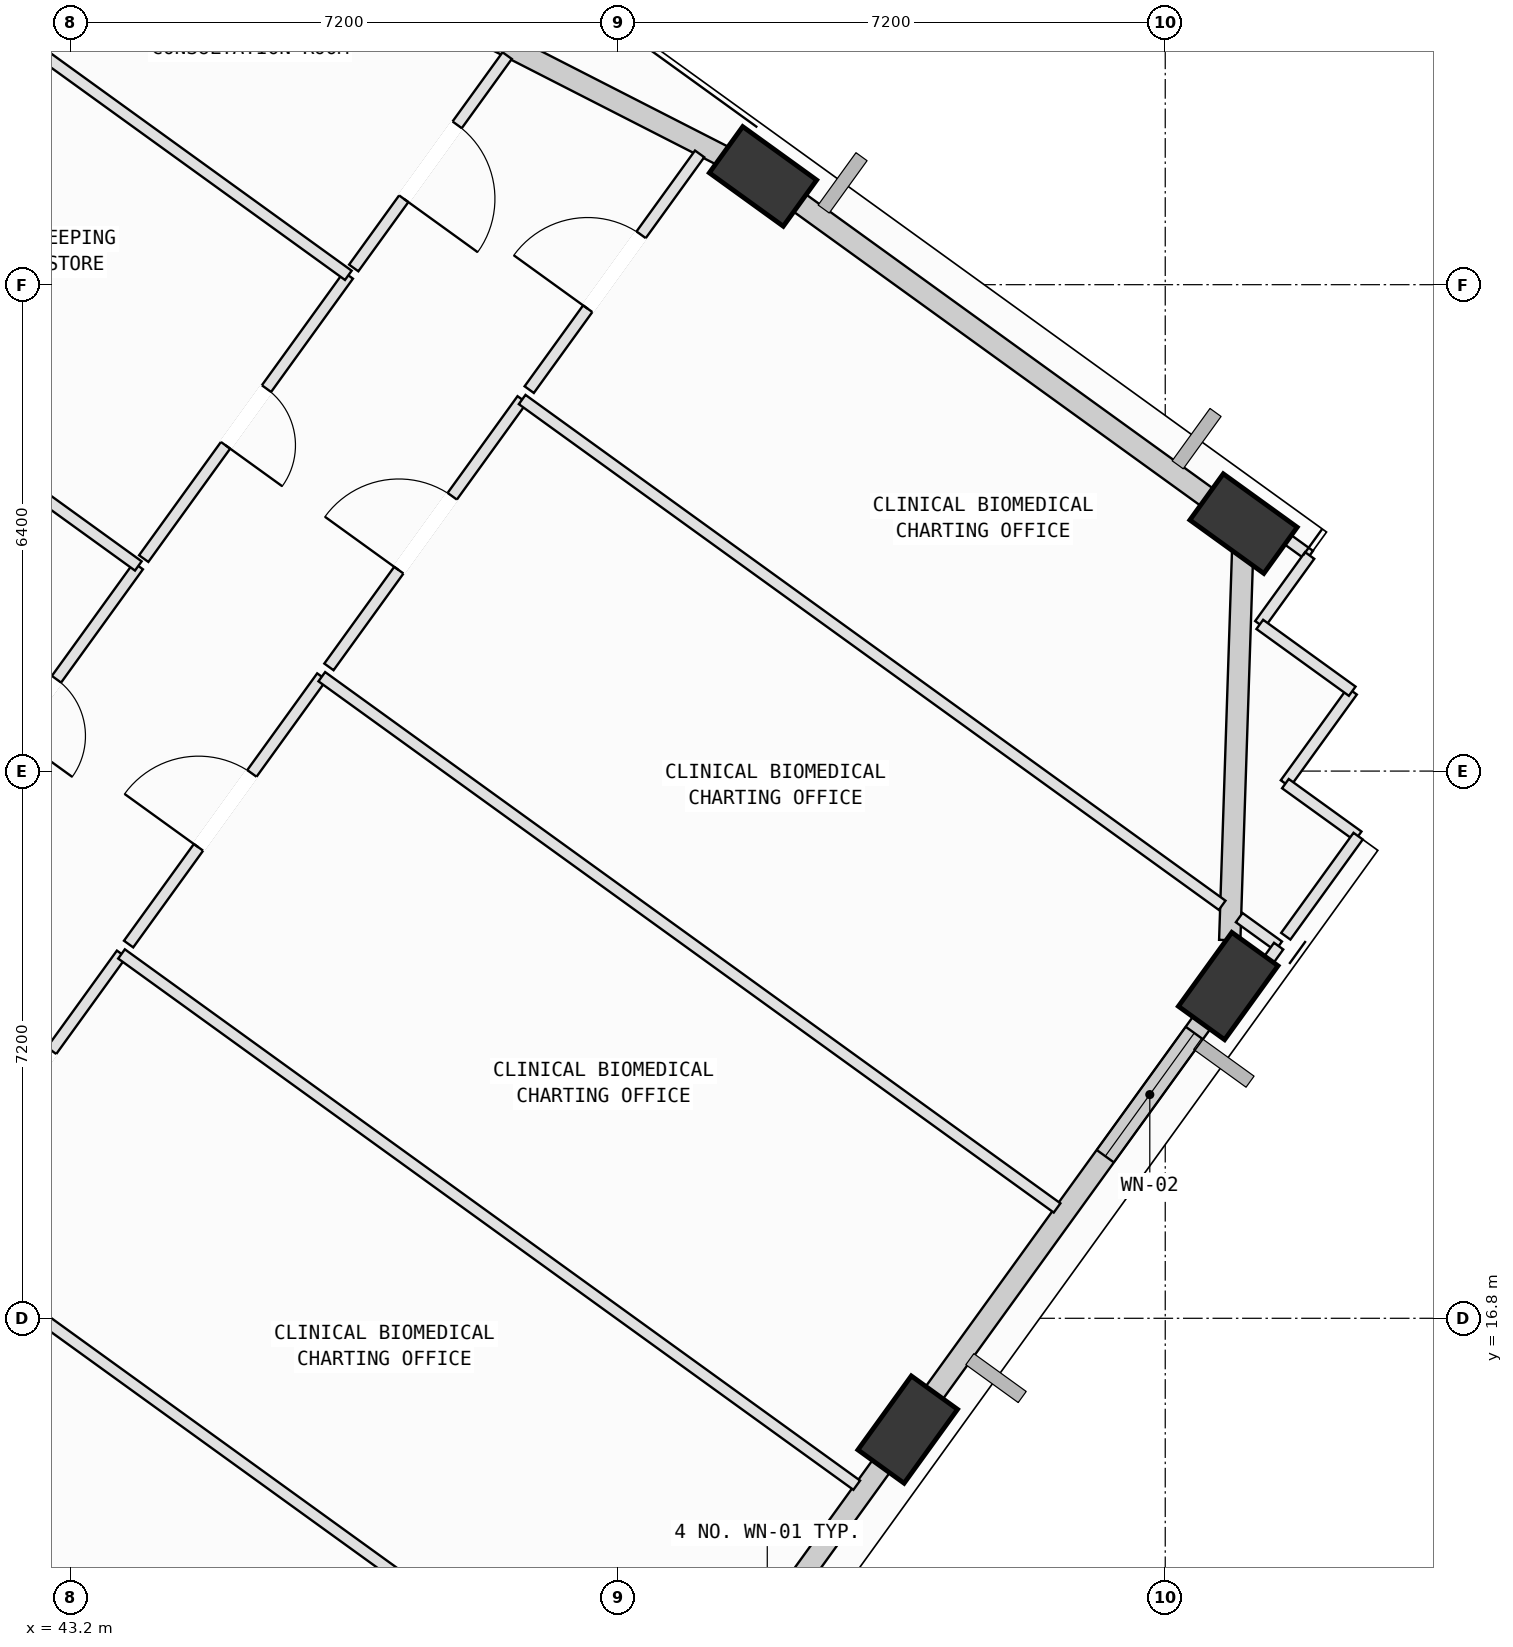
"""IFC4 building model, lengths in metres.
Left out: names, types, materials, properties, quantities, classifications, styles, units other than length and angle.
Written with IfcOpenShell. Run it as: python <this file> out.ifc"""

import sys

from ifc_helpers import new_model, si_unit, direction, frame, frame_2d, origin, origin_2d, place, context, subcontext, project, spatial, rectangle, extrude, element, fill, save


model = new_model("IFC4")
c1 = context("Model", 3, precision=1e-05, world=origin(), true_north=direction((0.0, 1.0)))
c2 = subcontext(c1, "Body", "Model", "MODEL_VIEW")
j1 = project(units=[si_unit("LENGTHUNIT", "METRE"), si_unit("PLANEANGLEUNIT", "RADIAN")], contexts=[c1])
p1 = place(None, origin())
s1 = spatial("IfcSite", under=j1, at=p1, CompositionType="ELEMENT")
p2 = place(p1, origin())
s2 = spatial("IfcBuilding", under=s1, at=p2, CompositionType="ELEMENT")
p3 = place(p2, frame((0.0, 0.0, 255.2)))
s3 = spatial("IfcBuildingStorey", under=s2, at=p3, CompositionType="ELEMENT", Elevation=255.2)
p4 = place(p3, frame((54.212, 15.335, 0.002), z_axis=(0.038318426238, 0.085395349901, 0.995610030296), x_axis=(-0.864713750132, -0.496502169968, 0.075866498211)))
e1 = element("IfcColumn", 1, at=p4, inside=s3, PredefinedType="COLUMN", context=c2, shape_type="SweptSolid", body=[
    extrude(rectangle(XDim=1.2, YDim=0.75, at=origin_2d()), origin(), (0.0, 0.0, 1.0), 4.014),
])
p5 = place(p3, frame((58.428, 21.172, 0.002), z_axis=(0.014157894762, 0.102447255662, 0.994637679672), x_axis=(-0.69051780132, -0.718441374913, 0.08382813891)))
e2 = element("IfcColumn", 2, at=p5, inside=s3, PredefinedType="COLUMN", context=c2, shape_type="SweptSolid", body=[
    extrude(rectangle(XDim=1.2, YDim=0.75, at=origin_2d()), origin(), (0.0, 0.0, 1.0), 4.018),
])
p6 = place(p3, frame((58.63, 27.256, 0.002), z_axis=(-0.010937120027, 0.103112737144, 0.994609542908), x_axis=(0.867473204164, -0.493763417536, 0.060728309384)))
e3 = element("IfcColumn", 3, at=p6, inside=s3, PredefinedType="COLUMN", context=c2, shape_type="SweptSolid", body=[
    extrude(rectangle(XDim=1.2, YDim=0.75, at=origin_2d()), origin(), (0.0, 0.0, 1.0), 4.018),
])
p7 = place(p3, frame((52.308, 31.824, 0.002), z_axis=(-0.029649872791, 0.077016610023, 0.996588845424), x_axis=(0.966131124092, -0.253484840715, 0.048333079659)))
e4 = element("IfcColumn", 4, at=p7, inside=s3, PredefinedType="COLUMN", context=c2, shape_type="SweptSolid", body=[
    extrude(rectangle(XDim=1.2, YDim=0.75, at=origin_2d()), origin(), (0.0, 0.0, 1.0), 4.01),
])
p8 = place(p3, frame((54.088, 15.164, 0.0), z_axis=(0.0, 0.0, 1.0), x_axis=(-0.585656107045, -0.810559636474, 0.0)))
e5 = element("IfcWall", 5, at=p8, inside=s3, PredefinedType="SOLIDWALL", context=c2, shape_type="SweptSolid", body=[
    extrude(rectangle(XDim=6.407, YDim=0.28, at=frame_2d((3.203, 0.0))), origin(), (0.0, 0.0, 1.0), 3.265),
])
p9 = place(p8, frame((2.143, 0.0, 0.75)))
e6 = element("IfcOpeningElement", 6, at=p9, cuts=e5, PredefinedType="OPENING", context=c2, shape_type="SweptSolid", body=[
    extrude(rectangle(XDim=1.6, YDim=1.95, at=frame_2d((0.8, 0.975))), frame((0.0, 0.15, 0.0), z_axis=(0.0, -1.0, 0.0), x_axis=(1.0, 0.0, 0.0)), (0.0, 0.0, 1.0), 0.3),
])
p10 = place(p3, frame((58.31, 21.008, 0.0), z_axis=(0.0, 0.0, 1.0), x_axis=(-0.585669695787, -0.810549817986, 0.0)))
e7 = element("IfcWall", 7, at=p10, inside=s3, PredefinedType="SOLIDWALL", context=c2, shape_type="SweptSolid", body=[
    extrude(rectangle(XDim=6.418, YDim=0.28, at=frame_2d((3.209, 0.0))), origin(), (0.0, 0.0, 1.0), 3.265),
])
p11 = place(p10, frame((0.56, 0.0, 0.75)))
e8 = element("IfcOpeningElement", 8, at=p11, cuts=e7, PredefinedType="OPENING", context=c2, shape_type="SweptSolid", body=[
    extrude(rectangle(XDim=2.0, YDim=1.95, at=frame_2d((1.0, 0.975))), frame((0.0, 0.15, 0.0), z_axis=(0.0, -1.0, 0.0), x_axis=(1.0, 0.0, 0.0)), (0.0, 0.0, 1.0), 0.3),
])
p12 = place(p3, frame((58.624, 27.066, 0.0), z_axis=(0.0, 0.0, 1.0), x_axis=(-0.03315820566, -0.999450115512, 0.0)))
e9 = element("IfcWall", 9, at=p12, inside=s3, PredefinedType="SOLIDWALL", context=c2, shape_type="SweptSolid", body=[
    extrude(rectangle(XDim=5.294, YDim=0.28, at=frame_2d((2.647, 0.0))), origin(), (0.0, 0.0, 1.0), 3.265),
])
p13 = place(p3, frame((52.509, 31.679, 0.0), z_axis=(0.0, 0.0, 1.0), x_axis=(0.81055861037, -0.58565752719, 0.0)))
e10 = element("IfcWall", 10, at=p13, inside=s3, PredefinedType="SOLIDWALL", context=c2, shape_type="SweptSolid", body=[
    extrude(rectangle(XDim=7.046, YDim=0.28, at=frame_2d((3.523, 0.0))), origin(), (0.0, 0.0, 1.0), 3.265),
])
p14 = place(p3, frame((43.811, 36.165, 0.0), z_axis=(0.0, 0.0, 1.0), x_axis=(0.890535873605, -0.454913022261, 0.0)))
e11 = element("IfcWall", 11, at=p14, inside=s3, PredefinedType="SOLIDWALL", context=c2, shape_type="SweptSolid", body=[
    extrude(rectangle(XDim=9.037, YDim=0.28, at=frame_2d((4.518, 0.0))), origin(), (0.0, 0.0, 1.0), 3.265),
])
p15 = place(p3, frame((39.381, 30.496, 0.0), z_axis=(0.0, 0.0, 1.0), x_axis=(0.585668033743, 0.810551018908, 0.0)))
e12 = element("IfcWall", 12, at=p15, inside=s3, PredefinedType="SOLIDWALL", context=c2, shape_type="SweptSolid", body=[
    extrude(rectangle(XDim=6.78, YDim=0.28, at=frame_2d((3.39, 0.0))), origin(), (0.0, 0.0, 1.0), 3.265),
])
p16 = place(p15, frame((1.295, 0.0, 0.75)))
e13 = element("IfcOpeningElement", 13, at=p16, cuts=e12, PredefinedType="OPENING", context=c2, shape_type="SweptSolid", body=[
    extrude(rectangle(XDim=1.6, YDim=1.95, at=frame_2d((0.8, 0.975))), frame((0.0, 0.15, 0.0), z_axis=(0.0, -1.0, 0.0), x_axis=(1.0, 0.0, 0.0)), (0.0, 0.0, 1.0), 0.3),
])
for number, where, z_axis, x_axis in (
    (14, (38.655, 14.38, 0.0), (0.0, 0.0, 1.0), (0.811, -0.586, 0.0)),
    (15, (41.232, 17.947, 0.0), (0.0, 0.0, 1.0), (0.811, -0.586, 0.0)),
):
    element("IfcWall", number, at=place(p3, frame(where, z_axis=z_axis, x_axis=x_axis)), inside=s3, PredefinedType="PARTITIONING", context=c2, shape_type="SweptSolid", body=[
        extrude(rectangle(XDim=11.935, YDim=0.15, at=frame_2d((5.968, 0.0))), origin(), (0.0, 0.0, 1.0), 3.78),
    ])
p17 = place(p3, frame((41.326, 18.076, 0.0), z_axis=(0.0, 0.0, 1.0), x_axis=(0.585667160303, 0.810551650016, 0.0)))
e16 = element("IfcWall", 16, at=p17, inside=s3, PredefinedType="PARTITIONING", context=c2, shape_type="SweptSolid", body=[
    extrude(rectangle(XDim=4.34, YDim=0.15, at=frame_2d((2.17, 0.0))), origin(), (0.0, 0.0, 1.0), 3.78),
])
p18 = place(p17, frame((1.57, 0.0, 0.0)))
e17 = element("IfcOpeningElement", 17, at=p18, cuts=e16, PredefinedType="OPENING", context=c2, shape_type="SweptSolid", body=[
    extrude(rectangle(XDim=1.2, YDim=2.15, at=frame_2d((0.6, 1.075))), frame((0.0, 0.085, 0.0), z_axis=(0.0, -1.0, 0.0), x_axis=(1.0, 0.0, 0.0)), (0.0, 0.0, 1.0), 0.17),
])
p19 = place(p3, frame((43.868, 21.594, 0.0), z_axis=(0.0, 0.0, 1.0), x_axis=(0.810525461994, -0.585703402295, 0.0)))
e18 = element("IfcWall", 18, at=p19, inside=s3, PredefinedType="PARTITIONING", context=c2, shape_type="SweptSolid", body=[
    extrude(rectangle(XDim=11.934, YDim=0.15, at=frame_2d((5.967, 0.0))), origin(), (0.0, 0.0, 1.0), 3.78),
])
p20 = place(p3, frame((43.961, 21.724, 0.0), z_axis=(0.0, 0.0, 1.0), x_axis=(0.585693863478, 0.810532354865, 0.0)))
e19 = element("IfcWall", 19, at=p20, inside=s3, PredefinedType="PARTITIONING", context=c2, shape_type="SweptSolid", body=[
    extrude(rectangle(XDim=4.34, YDim=0.15, at=frame_2d((2.17, 0.0))), origin(), (0.0, 0.0, 1.0), 3.78),
])
p21 = place(p20, frame((1.57, 0.0, 0.0)))
e20 = element("IfcOpeningElement", 20, at=p21, cuts=e19, PredefinedType="OPENING", context=c2, shape_type="SweptSolid", body=[
    extrude(rectangle(XDim=1.2, YDim=2.15, at=frame_2d((0.6, 1.075))), frame((0.0, 0.085, 0.0), z_axis=(0.0, -1.0, 0.0), x_axis=(1.0, 0.0, 0.0)), (0.0, 0.0, 1.0), 0.17),
])
p22 = place(p3, frame((46.503, 25.242, 0.0), z_axis=(0.0, 0.0, 1.0), x_axis=(0.810553530126, -0.585664558259, 0.0)))
e21 = element("IfcWall", 21, at=p22, inside=s3, PredefinedType="PARTITIONING", context=c2, shape_type="SweptSolid", body=[
    extrude(rectangle(XDim=11.935, YDim=0.15, at=frame_2d((5.968, 0.0))), origin(), (0.0, 0.0, 1.0), 3.78),
])
p23 = place(p3, frame((54.738, 15.671, 0.0), z_axis=(0.0, 0.0, 1.0), x_axis=(-0.585951871419, -0.810345854793, 0.0)))
e22 = element("IfcWall", 22, at=p23, inside=s3, PredefinedType="PARTITIONING", context=c2, shape_type="SweptSolid", body=[
    extrude(rectangle(XDim=0.792, YDim=0.15, at=frame_2d((0.396, 0.0))), origin(), (0.0, 0.0, 1.0), 3.265),
])
p24 = place(p3, frame((46.597, 25.371, 0.0), z_axis=(0.0, 0.0, 1.0), x_axis=(0.585693863478, 0.810532354865, 0.0)))
e23 = element("IfcWall", 23, at=p24, inside=s3, PredefinedType="PARTITIONING", context=c2, shape_type="SweptSolid", body=[
    extrude(rectangle(XDim=4.34, YDim=0.15, at=frame_2d((2.17, 0.0))), origin(), (0.0, 0.0, 1.0), 3.78),
])
p25 = place(p24, frame((1.57, 0.0, 0.0)))
e24 = element("IfcOpeningElement", 24, at=p25, cuts=e23, PredefinedType="OPENING", context=c2, shape_type="SweptSolid", body=[
    extrude(rectangle(XDim=1.2, YDim=2.15, at=frame_2d((0.6, 1.075))), frame((0.0, 0.085, 0.0), z_axis=(0.0, -1.0, 0.0), x_axis=(1.0, 0.0, 0.0)), (0.0, 0.0, 1.0), 0.17),
])
p26 = place(p3, frame((49.139, 28.889, 0.0), z_axis=(0.0, 0.0, 1.0), x_axis=(0.810544932865, -0.585676456593, 0.0)))
e25 = element("IfcWall", 25, at=p26, inside=s3, PredefinedType="PARTITIONING", context=c2, shape_type="SweptSolid", body=[
    extrude(rectangle(XDim=11.363, YDim=0.15, at=frame_2d((5.682, 0.0))), origin(), (0.0, 0.0, 1.0), 3.78),
])
p27 = place(p3, frame((58.573, 22.072, 0.0), z_axis=(0.0, 0.0, 1.0), x_axis=(0.810578678886, -0.585629751067, 0.0)))
e26 = element("IfcWall", 26, at=p27, inside=s3, PredefinedType="PARTITIONING", context=c2, shape_type="SweptSolid", body=[
    extrude(rectangle(XDim=0.64, YDim=0.15, at=frame_2d((0.32, 0.0))), origin(), (0.0, 0.0, 1.0), 3.78),
])
p28 = place(p3, frame((59.092, 21.697, 0.0), z_axis=(0.0, 0.0, 1.0), x_axis=(-0.58541161529, -0.810736233731, 0.0)))
e27 = element("IfcWall", 27, at=p28, inside=s3, PredefinedType="PARTITIONING", context=c2, shape_type="SweptSolid", body=[
    extrude(rectangle(XDim=1.016, YDim=0.15, at=frame_2d((0.508, 0.0))), origin(), (0.0, 0.0, 1.0), 3.265),
])
p29 = place(p3, frame((60.06, 25.051, 0.0), z_axis=(0.0, 0.0, 1.0), x_axis=(-0.585876607151, -0.810400272207, 0.0)))
e28 = element("IfcWall", 28, at=p29, inside=s3, PredefinedType="PARTITIONING", context=c2, shape_type="SweptSolid", body=[
    extrude(rectangle(XDim=1.5, YDim=0.15, at=frame_2d((0.75, 0.0))), origin(), (0.0, 0.0, 1.0), 3.78),
])
p30 = place(p3, frame((59.181, 23.835, 0.0), z_axis=(0.0, 0.0, 1.0), x_axis=(0.810788295009, -0.585339508897, 0.0)))
e29 = element("IfcWall", 29, at=p30, inside=s3, PredefinedType="PARTITIONING", context=c2, shape_type="SweptSolid", body=[
    extrude(rectangle(XDim=1.18, YDim=0.15, at=frame_2d((0.59, 0.0))), origin(), (0.0, 0.0, 1.0), 3.78),
])
p31 = place(p3, frame((60.138, 23.144, 0.0), z_axis=(0.0, 0.0, 1.0), x_axis=(-0.58574832326, -0.810492999228, 0.0)))
e30 = element("IfcWall", 30, at=p31, inside=s3, PredefinedType="PARTITIONING", context=c2, shape_type="SweptSolid", body=[
    extrude(rectangle(XDim=1.625, YDim=0.15, at=frame_2d((0.812, 0.0))), origin(), (0.0, 0.0, 1.0), 3.78),
])
p32 = place(p3, frame((49.232, 29.019, 0.0), z_axis=(0.0, 0.0, 1.0), x_axis=(0.58580257886, 0.810453785605, 0.0)))
e31 = element("IfcWall", 31, at=p32, inside=s3, PredefinedType="PARTITIONING", context=c2, shape_type="SweptSolid", body=[
    extrude(rectangle(XDim=3.828, YDim=0.15, at=frame_2d((1.914, 0.0))), origin(), (0.0, 0.0, 1.0), 3.78),
])
p33 = place(p32, frame((1.314, 0.0, 0.0)))
e32 = element("IfcOpeningElement", 32, at=p33, cuts=e31, PredefinedType="OPENING", context=c2, shape_type="SweptSolid", body=[
    extrude(rectangle(XDim=1.2, YDim=2.15, at=frame_2d((0.6, 1.075))), frame((0.0, 0.085, 0.0), z_axis=(0.0, -1.0, 0.0), x_axis=(1.0, 0.0, 0.0)), (0.0, 0.0, 1.0), 0.17),
])
p34 = place(p3, frame((51.972, 32.277, 0.0), z_axis=(0.0, 0.0, 1.0), x_axis=(0.810572713007, -0.585638008439, 0.0)))
e33 = element("IfcWall", 33, at=p34, inside=s3, PredefinedType="PARTITIONING", context=c2, shape_type="SweptSolid", body=[
    extrude(rectangle(XDim=0.786, YDim=0.15, at=frame_2d((0.393, 0.0))), origin(), (0.0, 0.0, 1.0), 3.265),
])
p35 = place(p3, frame((58.32, 27.69, 0.0), z_axis=(0.0, 0.0, 1.0), x_axis=(0.810400575894, -0.585876187083, 0.0)))
e34 = element("IfcWall", 34, at=p35, inside=s3, PredefinedType="PARTITIONING", context=c2, shape_type="SweptSolid", body=[
    extrude(rectangle(XDim=1.456, YDim=0.15, at=frame_2d((0.728, 0.0))), origin(), (0.0, 0.0, 1.0), 3.265),
])
p36 = place(p3, frame((59.5, 26.837, 0.0), z_axis=(0.0, 0.0, 1.0), x_axis=(-0.586055810718, -0.810270687316, 0.0)))
e35 = element("IfcWall", 35, at=p36, inside=s3, PredefinedType="PARTITIONING", context=c2, shape_type="SweptSolid", body=[
    extrude(rectangle(XDim=1.119, YDim=0.15, at=frame_2d((0.56, 0.0))), origin(), (0.0, 0.0, 1.0), 3.78),
])
p37 = place(p3, frame((58.844, 25.93, 0.0), z_axis=(0.0, 0.0, 1.0), x_axis=(0.810477520797, -0.585769739986, 0.0)))
e36 = element("IfcWall", 36, at=p37, inside=s3, PredefinedType="PARTITIONING", context=c2, shape_type="SweptSolid", body=[
    extrude(rectangle(XDim=1.5, YDim=0.15, at=frame_2d((0.75, 0.0))), origin(), (0.0, 0.0, 1.0), 3.78),
])
p38 = place(p3, frame((44.089, 26.699, 0.0), z_axis=(0.0, 0.0, 1.0), x_axis=(-0.585544838351, -0.810640020157, 0.0)))
e37 = element("IfcWall", 37, at=p38, inside=s3, PredefinedType="PARTITIONING", context=c2, shape_type="SweptSolid", body=[
    extrude(rectangle(XDim=4.598, YDim=0.15, at=frame_2d((2.299, 0.0))), origin(), (0.0, 0.0, 1.0), 3.78),
])
p39 = place(p38, frame((1.839, 0.0, 0.0)))
e38 = element("IfcOpeningElement", 38, at=p39, cuts=e37, PredefinedType="OPENING", context=c2, shape_type="SweptSolid", body=[
    extrude(rectangle(XDim=0.92, YDim=2.1, at=frame_2d((0.46, 1.05))), frame((0.0, 0.085, 0.0), z_axis=(0.0, -1.0, 0.0), x_axis=(1.0, 0.0, 0.0)), (0.0, 0.0, 1.0), 0.17),
])
p40 = place(p3, frame((38.748, 30.559, 0.0), z_axis=(0.0, 0.0, 1.0), x_axis=(0.810486733326, -0.585756993217, 0.0)))
e39 = element("IfcWall", 39, at=p40, inside=s3, PredefinedType="PARTITIONING", context=c2, shape_type="SweptSolid", body=[
    extrude(rectangle(XDim=6.59, YDim=0.15, at=frame_2d((3.295, 0.0))), origin(), (0.0, 0.0, 1.0), 3.78),
])
p41 = place(p3, frame((46.852, 30.523, 0.0), z_axis=(0.0, 0.0, 1.0), x_axis=(-0.585544838351, -0.810640020157, 0.0)))
e40 = element("IfcWall", 40, at=p41, inside=s3, PredefinedType="PARTITIONING", context=c2, shape_type="SweptSolid", body=[
    extrude(rectangle(XDim=4.598, YDim=0.15, at=frame_2d((2.299, 0.0))), origin(), (0.0, 0.0, 1.0), 3.78),
])
p42 = place(p41, frame((1.839, 0.0, 0.0)))
e41 = element("IfcOpeningElement", 41, at=p42, cuts=e40, PredefinedType="OPENING", context=c2, shape_type="SweptSolid", body=[
    extrude(rectangle(XDim=0.92, YDim=2.1, at=frame_2d((0.46, 1.05))), frame((0.0, 0.085, 0.0), z_axis=(0.0, -1.0, 0.0), x_axis=(1.0, 0.0, 0.0)), (0.0, 0.0, 1.0), 0.17),
])
p43 = place(p3, frame((42.05, 33.993, 0.0), z_axis=(0.0, 0.0, 1.0), x_axis=(0.81053033329, -0.585696661094, 0.0)))
e42 = element("IfcWall", 42, at=p43, inside=s3, PredefinedType="PARTITIONING", context=c2, shape_type="SweptSolid", body=[
    extrude(rectangle(XDim=5.925, YDim=0.15, at=frame_2d((2.962, 0.0))), origin(), (0.0, 0.0, 1.0), 3.78),
])
p44 = place(p3, frame((48.942, 33.414, 0.0), z_axis=(0.0, 0.0, 1.0), x_axis=(-0.585671558501, -0.810548472063, 0.0)))
e43 = element("IfcWall", 43, at=p44, inside=s3, PredefinedType="PARTITIONING", context=c2, shape_type="SweptSolid", body=[
    extrude(rectangle(XDim=3.447, YDim=0.15, at=frame_2d((1.724, 0.0))), origin(), (0.0, 0.0, 1.0), 3.78),
])
p45 = place(p44, frame((1.124, 0.0, 0.0)))
e44 = element("IfcOpeningElement", 44, at=p45, cuts=e43, PredefinedType="OPENING", context=c2, shape_type="SweptSolid", body=[
    extrude(rectangle(XDim=1.2, YDim=2.15, at=frame_2d((0.6, 1.075))), frame((0.0, 0.085, 0.0), z_axis=(0.0, -1.0, 0.0), x_axis=(1.0, 0.0, 0.0)), (0.0, 0.0, 1.0), 0.17),
])
p46 = place(p11, origin())
e45 = element("IfcWindow", 45, at=p46, inside=s3, PartitioningType="SINGLE_PANEL", PredefinedType="WINDOW", context=c2, shape_type="SweptSolid", body=[
    extrude(rectangle(XDim=2.0, YDim=1.95, at=frame_2d((1.0, 0.975))), frame((0.0, 0.03, 0.0), z_axis=(0.0, -1.0, 0.0), x_axis=(1.0, 0.0, 0.0)), (0.0, 0.0, 1.0), 0.06),
])
fill(e8, e45)
p47 = place(p18, origin())
e46 = element("IfcDoor", 46, at=p47, inside=s3, OperationType="SINGLE_SWING_RIGHT", PredefinedType="DOOR", context=c2, shape_type="SweptSolid", body=[
    extrude(rectangle(XDim=1.2, YDim=2.15, at=frame_2d((0.6, 1.075))), frame((0.0, 0.025, 0.0), z_axis=(0.0, -1.0, 0.0), x_axis=(1.0, 0.0, 0.0)), (0.0, 0.0, 1.0), 0.05),
])
fill(e17, e46)
p48 = place(p21, origin())
e47 = element("IfcDoor", 47, at=p48, inside=s3, OperationType="SINGLE_SWING_LEFT", PredefinedType="DOOR", context=c2, shape_type="SweptSolid", body=[
    extrude(rectangle(XDim=1.2, YDim=2.15, at=frame_2d((0.6, 1.075))), frame((0.0, 0.025, 0.0), z_axis=(0.0, -1.0, 0.0), x_axis=(1.0, 0.0, 0.0)), (0.0, 0.0, 1.0), 0.05),
])
fill(e20, e47)
p49 = place(p25, origin())
e48 = element("IfcDoor", 48, at=p49, inside=s3, OperationType="SINGLE_SWING_LEFT", PredefinedType="DOOR", context=c2, shape_type="SweptSolid", body=[
    extrude(rectangle(XDim=1.2, YDim=2.15, at=frame_2d((0.6, 1.075))), frame((0.0, 0.025, 0.0), z_axis=(0.0, -1.0, 0.0), x_axis=(1.0, 0.0, 0.0)), (0.0, 0.0, 1.0), 0.05),
])
fill(e24, e48)
p50 = place(p33, origin())
e49 = element("IfcDoor", 49, at=p50, inside=s3, OperationType="SINGLE_SWING_LEFT", PredefinedType="DOOR", context=c2, shape_type="SweptSolid", body=[
    extrude(rectangle(XDim=1.2, YDim=2.15, at=frame_2d((0.6, 1.075))), frame((0.0, 0.025, 0.0), z_axis=(0.0, -1.0, 0.0), x_axis=(1.0, 0.0, 0.0)), (0.0, 0.0, 1.0), 0.05),
])
fill(e32, e49)
p51 = place(p39, origin())
e50 = element("IfcDoor", 50, at=p51, inside=s3, OperationType="SINGLE_SWING_RIGHT", PredefinedType="DOOR", context=c2, shape_type="SweptSolid", body=[
    extrude(rectangle(XDim=0.92, YDim=2.1, at=frame_2d((0.46, 1.05))), frame((0.0, 0.025, 0.0), z_axis=(0.0, -1.0, 0.0), x_axis=(1.0, 0.0, 0.0)), (0.0, 0.0, 1.0), 0.05),
])
fill(e38, e50)
p52 = place(p42, origin())
e51 = element("IfcDoor", 51, at=p52, inside=s3, OperationType="SINGLE_SWING_RIGHT", PredefinedType="DOOR", context=c2, shape_type="SweptSolid", body=[
    extrude(rectangle(XDim=0.92, YDim=2.1, at=frame_2d((0.46, 1.05))), frame((0.0, 0.025, 0.0), z_axis=(0.0, -1.0, 0.0), x_axis=(1.0, 0.0, 0.0)), (0.0, 0.0, 1.0), 0.05),
])
fill(e41, e51)
p53 = place(p45, origin())
e52 = element("IfcDoor", 52, at=p53, inside=s3, OperationType="SINGLE_SWING_RIGHT", PredefinedType="DOOR", context=c2, shape_type="SweptSolid", body=[
    extrude(rectangle(XDim=1.2, YDim=2.15, at=frame_2d((0.6, 1.075))), frame((0.0, 0.025, 0.0), z_axis=(0.0, -1.0, 0.0), x_axis=(1.0, 0.0, 0.0)), (0.0, 0.0, 1.0), 0.05),
])
fill(e44, e52)
save(model, sys.argv[1])
